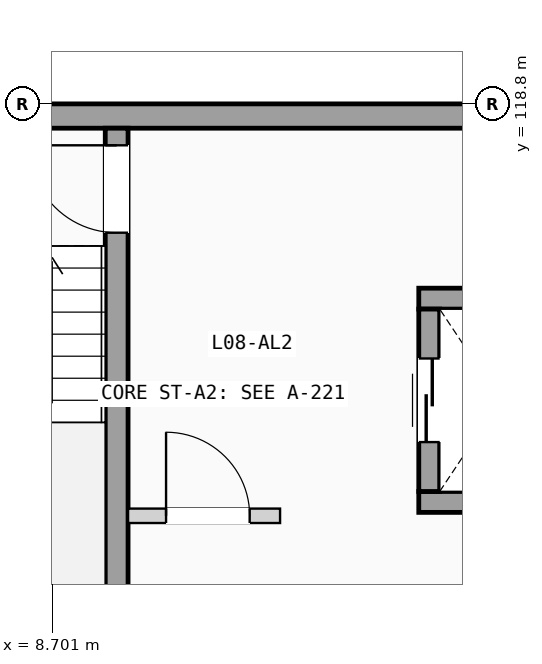
"""IFC4 building model, lengths in metres.
Left out: names, types, materials, properties, quantities, classifications, styles, units other than length and angle.
Written with IfcOpenShell. Run it as: python <this file> out.ifc"""

import sys

from ifc_helpers import new_model, si_unit, direction, frame, frame_2d, origin, place, context, subcontext, project, spatial, rectangle, extrude, element, fill, save


model = new_model("IFC4")
c1 = context("Model", 3, precision=1e-05, world=origin(), true_north=direction((0.0, 1.0)))
c2 = subcontext(c1, "Body", "Model", "MODEL_VIEW")
j1 = project(units=[si_unit("LENGTHUNIT", "METRE"), si_unit("PLANEANGLEUNIT", "RADIAN")], contexts=[c1])
p1 = place(None, origin())
s1 = spatial("IfcSite", under=j1, at=p1, CompositionType="ELEMENT")
p2 = place(p1, origin())
s2 = spatial("IfcBuilding", under=s1, at=p2, CompositionType="ELEMENT")
p3 = place(p2, frame((0.0, 0.0, 27.825)))
s3 = spatial("IfcBuildingStorey", under=s2, at=p3, CompositionType="ELEMENT", Elevation=27.825)
p4 = place(p3, frame((0.0, 118.64, 0.0), z_axis=(0.0, 0.0, 1.0), x_axis=(1.0, 0.0, 0.0)))
e1 = element("IfcWall", 1, at=p4, inside=s3, PredefinedType="SOLIDWALL", context=c2, shape_type="SweptSolid", body=[
    extrude(rectangle(XDim=21.6, YDim=0.32, at=frame_2d((10.8, 0.0))), origin(), (0.0, 0.0, 1.0), 2.89),
])
p5 = place(p3, frame((9.55, 111.48, 0.0), z_axis=(0.0, 0.0, 1.0), x_axis=(0.0, 1.0, 0.0)))
e2 = element("IfcWall", 2, at=p5, inside=s3, PredefinedType="SHEAR", context=c2, shape_type="SweptSolid", body=[
    extrude(rectangle(XDim=7.0, YDim=0.3, at=frame_2d((3.5, 0.0))), origin(), (0.0, 0.0, 1.0), 2.89),
])
p6 = place(p5, frame((5.625, 0.0, 0.0)))
e3 = element("IfcOpeningElement", 3, at=p6, cuts=e2, PredefinedType="OPENING", context=c2, shape_type="SweptSolid", body=[
    extrude(rectangle(XDim=1.15, YDim=2.12, at=frame_2d((0.575, 1.06))), frame((0.0, 0.16, 0.0), z_axis=(0.0, -1.0, 0.0), x_axis=(1.0, 0.0, 0.0)), (0.0, 0.0, 1.0), 0.32),
])
for number, where, z_axis, x_axis in (
    (4, (13.525, 113.562, 0.0), (0.0, 0.0, 1.0), (1.0, 0.0, 0.0)),
    (5, (13.525, 116.238, 0.0), (0.0, 0.0, 1.0), (1.0, 0.0, 0.0)),
):
    element("IfcWall", number, at=place(p3, frame(where, z_axis=z_axis, x_axis=x_axis)), inside=s3, PredefinedType="SHEAR", context=c2, shape_type="SweptSolid", body=[
        extrude(rectangle(XDim=2.15, YDim=0.275, at=frame_2d((1.075, 0.0))), origin(), (0.0, 0.0, 1.0), 2.89),
    ])
p7 = place(p3, frame((13.663, 113.7, 0.0), z_axis=(0.0, 0.0, 1.0), x_axis=(0.0, 1.0, 0.0)))
e6 = element("IfcWall", 6, at=p7, inside=s3, PredefinedType="SHEAR", context=c2, shape_type="SweptSolid", body=[
    extrude(rectangle(XDim=2.4, YDim=0.275, at=frame_2d((1.2, 0.0))), origin(), (0.0, 0.0, 1.0), 2.89),
])
p8 = place(p7, frame((0.65, 0.0, 0.0)))
e7 = element("IfcOpeningElement", 7, at=p8, cuts=e6, PredefinedType="OPENING", context=c2, shape_type="SweptSolid", body=[
    extrude(rectangle(XDim=1.1, YDim=2.15, at=frame_2d((0.55, 1.075))), frame((0.0, 0.147, 0.0), z_axis=(0.0, -1.0, 0.0), x_axis=(1.0, 0.0, 0.0)), (0.0, 0.0, 1.0), 0.295),
])
p9 = place(p3, frame((9.7, 113.38, 0.0), z_axis=(0.0, 0.0, 1.0), x_axis=(1.0, 0.0, 0.0)))
e8 = element("IfcWall", 8, at=p9, inside=s3, PredefinedType="PARTITIONING", context=c2, shape_type="SweptSolid", body=[
    extrude(rectangle(XDim=2.0, YDim=0.19, at=frame_2d((1.0, 0.0))), origin(), (0.0, 0.0, 1.0), 2.87),
])
p10 = place(p9, frame((0.5, 0.0, 0.0)))
e9 = element("IfcOpeningElement", 9, at=p10, cuts=e8, PredefinedType="OPENING", context=c2, shape_type="SweptSolid", body=[
    extrude(rectangle(XDim=1.1, YDim=2.12, at=frame_2d((0.55, 1.06))), frame((0.0, 0.105, 0.0), z_axis=(0.0, -1.0, 0.0), x_axis=(1.0, 0.0, 0.0)), (0.0, 0.0, 1.0), 0.21),
])
p11 = place(p6, origin())
e10 = element("IfcDoor", 10, at=p11, inside=s3, OperationType="SINGLE_SWING_RIGHT", PredefinedType="DOOR", context=c2, shape_type="SweptSolid", body=[
    extrude(rectangle(XDim=1.15, YDim=2.12, at=frame_2d((0.575, 1.06))), frame((0.0, 0.025, 0.0), z_axis=(0.0, -1.0, 0.0), x_axis=(1.0, 0.0, 0.0)), (0.0, 0.0, 1.0), 0.05),
])
fill(e3, e10)
p12 = place(p8, origin())
e11 = element("IfcDoor", 11, at=p12, inside=s3, OperationType="SLIDING_TO_LEFT", PredefinedType="DOOR", context=c2, shape_type="SweptSolid", body=[
    extrude(rectangle(XDim=1.1, YDim=2.15, at=frame_2d((0.55, 1.075))), frame((0.0, 0.025, 0.0), z_axis=(0.0, -1.0, 0.0), x_axis=(1.0, 0.0, 0.0)), (0.0, 0.0, 1.0), 0.05),
])
fill(e7, e11)
p13 = place(p10, origin())
e12 = element("IfcDoor", 12, at=p13, inside=s3, OperationType="SINGLE_SWING_LEFT", PredefinedType="DOOR", context=c2, shape_type="SweptSolid", body=[
    extrude(rectangle(XDim=1.1, YDim=2.12, at=frame_2d((0.55, 1.06))), frame((0.0, 0.025, 0.0), z_axis=(0.0, -1.0, 0.0), x_axis=(1.0, 0.0, 0.0)), (0.0, 0.0, 1.0), 0.05),
])
fill(e9, e12)
save(model, sys.argv[1])
